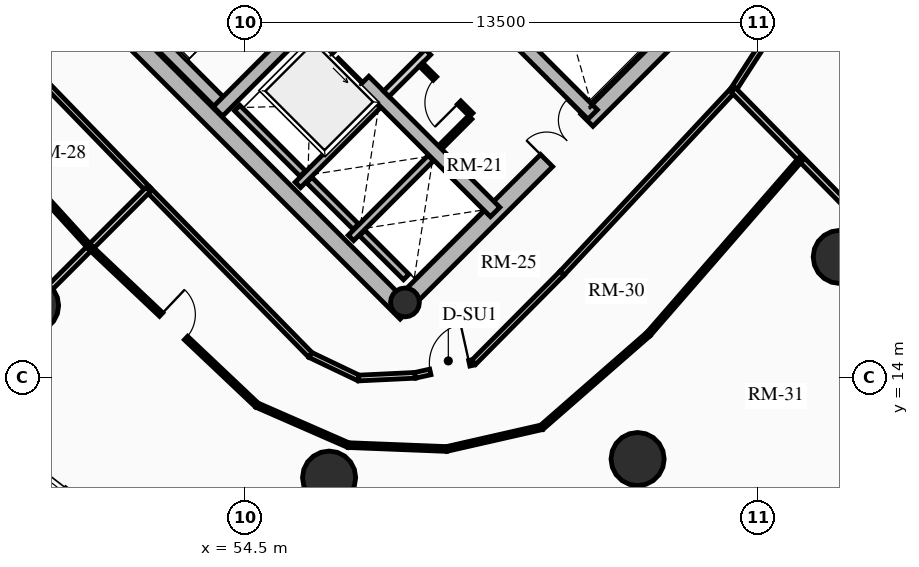
"""IFC4 building model, lengths in metres.
Left out: names, types, materials, properties, quantities, classifications, styles, units other than length and angle.
Written with IfcOpenShell. Run it as: python <this file> out.ifc"""

import sys

from ifc_helpers import new_model, si_unit, direction, frame, frame_2d, origin, origin_2d, place, context, subcontext, project, spatial, rectangle, circle, hollow_circle, extrude, source, transform, mapped, element, fill, save


model = new_model("IFC4")
c1 = context("Model", 3, precision=1e-05, world=origin(), true_north=direction((0.0, 1.0)))
c2 = subcontext(c1, "Body", "Model", "MODEL_VIEW")
j1 = project(units=[si_unit("LENGTHUNIT", "METRE"), si_unit("PLANEANGLEUNIT", "RADIAN")], contexts=[c1])
p1 = place(None, origin())
s1 = spatial("IfcSite", under=j1, at=p1, CompositionType="ELEMENT")
p2 = place(p1, origin())
s2 = spatial("IfcBuilding", under=s1, at=p2, CompositionType="ELEMENT")
p3 = place(p2, frame((0.0, 0.0, 93.43)))
s3 = spatial("IfcBuildingStorey", under=s2, at=p3, CompositionType="ELEMENT", Elevation=93.43)
p4 = place(p3, frame((58.737, 15.697, 0.0), z_axis=(0.0, 0.0, 1.0), x_axis=(-0.707106781187, 0.707106781187, 0.0)))
e1 = element("IfcWall", 1, at=p4, inside=s3, PredefinedType="SHEAR", context=c2, shape_type="SweptSolid", body=[
    extrude(rectangle(XDim=14.2, YDim=0.45, at=frame_2d((7.1, 0.0))), origin(), (0.0, 0.0, 1.0), 2.91),
])
p5 = place(p3, frame((58.578, 15.856, 0.0), z_axis=(0.0, 0.0, 1.0), x_axis=(0.707106781187, 0.707106781187, 0.0)))
e2 = element("IfcWall", 2, at=p5, inside=s3, PredefinedType="SHEAR", context=c2, shape_type="SweptSolid", body=[
    extrude(rectangle(XDim=10.7, YDim=0.45, at=frame_2d((5.35, 0.0))), origin(), (0.0, 0.0, 1.0), 2.91),
])
m1 = source(origin(), c2, "Body", "SweptSolid", [
    extrude(rectangle(XDim=1.5, YDim=2.02, at=frame_2d((0.75, 1.01))), frame((0.0, 0.235, 0.0), z_axis=(0.0, -1.0, 0.0), x_axis=(1.0, 0.0, 0.0)), (0.0, 0.0, 1.0), 0.47),
])
p6 = place(p5, frame((5.45, 0.0, 0.0)))
e3 = element("IfcOpeningElement", 3, at=p6, cuts=e2, PredefinedType="OPENING", context=c2, shape_type="MappedRepresentation", body=[
    mapped(m1, transform((0.0, 0.0, 0.0), x_axis=(1.0, 0.0, 0.0), y_axis=(0.0, 1.0, 0.0), z_axis=(0.0, 0.0, 1.0), scale=1.0)),
])
p7 = place(p3, frame((61.078, 18.355, 0.0), z_axis=(0.0, 0.0, 1.0), x_axis=(-0.707106781187, 0.707106781187, 0.0)))
e4 = element("IfcWall", 4, at=p7, inside=s3, PredefinedType="SHEAR", context=c2, shape_type="SweptSolid", body=[
    extrude(rectangle(XDim=13.75, YDim=0.35, at=frame_2d((6.875, 0.0))), origin(), (0.0, 0.0, 1.0), 2.91),
])
m2 = source(origin(), c2, "Body", "SweptSolid", [
    extrude(rectangle(XDim=1.1, YDim=2.015, at=frame_2d((0.55, 1.007))), frame((0.0, 0.185, 0.0), z_axis=(0.0, -1.0, 0.0), x_axis=(1.0, 0.0, 0.0)), (0.0, 0.0, 1.0), 0.37),
])
p8 = place(p7, frame((4.875, 0.0, 0.0)))
e5 = element("IfcOpeningElement", 5, at=p8, cuts=e4, PredefinedType="OPENING", context=c2, shape_type="MappedRepresentation", body=[
    mapped(m2, transform((0.0, 0.0, 0.0), x_axis=(1.0, 0.0, 0.0), y_axis=(0.0, 1.0, 0.0), z_axis=(0.0, 0.0, 1.0), scale=1.0)),
])
m3 = source(origin(), c2, "Body", "SweptSolid", [
    extrude(rectangle(XDim=1.15, YDim=2.02, at=frame_2d((0.575, 1.01))), frame((0.0, 0.185, 0.0), z_axis=(0.0, -1.0, 0.0), x_axis=(1.0, 0.0, 0.0)), (0.0, 0.0, 1.0), 0.37),
])
p9 = place(p7, frame((7.295, 0.0, 0.0)))
e6 = element("IfcOpeningElement", 6, at=p9, cuts=e4, PredefinedType="OPENING", context=c2, shape_type="MappedRepresentation", body=[
    mapped(m3, transform((0.0, 0.0, 0.0), x_axis=(1.0, 0.0, 0.0), y_axis=(0.0, 1.0, 0.0), z_axis=(0.0, 0.0, 1.0), scale=1.0)),
])
p10 = place(p3, frame((63.645, 20.922, 0.0), z_axis=(0.0, 0.0, 1.0), x_axis=(-0.707106781187, 0.707106781187, 0.0)))
e7 = element("IfcWall", 7, at=p10, inside=s3, PredefinedType="SHEAR", context=c2, shape_type="SweptSolid", body=[
    extrude(rectangle(XDim=13.75, YDim=0.35, at=frame_2d((6.875, 0.0))), origin(), (0.0, 0.0, 1.0), 2.91),
])
p11 = place(p10, frame((10.0, 0.0, 0.0)))
e8 = element("IfcOpeningElement", 8, at=p11, cuts=e7, PredefinedType="OPENING", context=c2, shape_type="MappedRepresentation", body=[
    mapped(m2, transform((0.0, 0.0, 0.0), x_axis=(1.0, 0.0, 0.0), y_axis=(0.0, 1.0, 0.0), z_axis=(0.0, 0.0, 1.0), scale=1.0)),
])
p12 = place(p10, frame((12.0, 0.0, 0.0)))
e9 = element("IfcOpeningElement", 9, at=p12, cuts=e7, PredefinedType="OPENING", context=c2, shape_type="MappedRepresentation", body=[
    mapped(m2, transform((0.0, 0.0, 0.0), x_axis=(1.0, 0.0, 0.0), y_axis=(0.0, 1.0, 0.0), z_axis=(0.0, 0.0, 1.0), scale=1.0)),
])
p13 = place(p10, frame((5.305, 0.0, 0.0)))
e10 = element("IfcOpeningElement", 10, at=p13, cuts=e7, PredefinedType="OPENING", context=c2, shape_type="MappedRepresentation", body=[
    mapped(m3, transform((0.0, 0.0, 0.0), x_axis=(1.0, 0.0, 0.0), y_axis=(0.0, 1.0, 0.0), z_axis=(0.0, 0.0, 1.0), scale=1.0)),
])
p14 = place(p3, frame((53.922, 21.141, 0.0), z_axis=(0.0, 0.0, 1.0), x_axis=(-0.707088616009, 0.707124945897, 0.0)))
e11 = element("IfcWall", 11, at=p14, inside=s3, PredefinedType="SHEAR", context=c2, shape_type="SweptSolid", body=[
    extrude(rectangle(XDim=6.72, YDim=0.35, at=frame_2d((3.36, 0.0))), origin(), (0.0, 0.0, 1.0), 2.91),
])
p15 = place(p3, frame((53.784, 21.003, 0.0), z_axis=(0.0, 0.0, 1.0), x_axis=(0.707106781187, 0.707106781187, 0.0)))
e12 = element("IfcWall", 12, at=p15, inside=s3, PredefinedType="SHEAR", context=c2, shape_type="SweptSolid", body=[
    extrude(rectangle(XDim=3.285, YDim=0.35, at=frame_2d((1.643, 0.0))), origin(), (0.0, 0.0, 1.0), 2.91),
])
p16 = place(p3, frame((58.706, 15.976, 0.0), z_axis=(0.0, 0.0, 1.0), x_axis=(0.707106781187, 0.707106781187, 0.0)))
e13 = element("IfcColumn", 13, at=p16, inside=s3, PredefinedType="COLUMN", context=c2, shape_type="SweptSolid", body=[
    extrude(hollow_circle(Radius=0.38, WallThickness=0.032, at=origin_2d()), origin(), (0.0, 0.0, 1.0), 2.91),
])
for number, where, z_axis, x_axis in (
    (14, (48.893, 15.893, 0.0), (0.0, 0.0, 1.0), (1.0, 0.0, 0.0)),
    (15, (56.709, 11.365, 0.0), (0.0, 0.0, 1.0), (1.0, 0.0, 0.0)),
    (16, (64.827, 11.854, 0.0), (0.0, 0.0, 1.0), (1.0, 0.0, 0.0)),
    (17, (70.146, 17.173, 0.0), (0.0, 0.0, 1.0), (1.0, 0.0, 0.0)),
):
    element("IfcColumn", number, at=place(p3, frame(where, z_axis=z_axis, x_axis=x_axis)), inside=s3, PredefinedType="USERDEFINED", context=c2, shape_type="SweptSolid", body=[
        extrude(circle(Radius=0.7, at=origin_2d()), origin(), (0.0, 0.0, 1.0), 2.91),
    ])
p17 = place(p3, frame((51.189, 9.855, 0.0), z_axis=(0.0, 0.0, 1.0), x_axis=(-0.791982052206, 0.61054437102, 0.0)))
e18 = element("IfcWall", 18, at=p17, inside=s3, PredefinedType="SOLIDWALL", context=c2, shape_type="SweptSolid", body=[
    extrude(rectangle(XDim=5.942, YDim=0.24, at=frame_2d((2.971, 0.0))), origin(), (0.0, 0.0, 1.0), 2.179),
])
m4 = source(origin(), c2, "Body", "SweptSolid", [
    extrude(rectangle(XDim=2.2, YDim=1.35, at=frame_2d((1.1, 0.675))), frame((0.0, 0.13, 0.0), z_axis=(0.0, -1.0, 0.0), x_axis=(1.0, 0.0, 0.0)), (0.0, 0.0, 1.0), 0.26),
])
p18 = place(p17, frame((1.871, 0.0, 0.65)))
e19 = element("IfcOpeningElement", 19, at=p18, cuts=e18, PredefinedType="OPENING", context=c2, shape_type="MappedRepresentation", body=[
    mapped(m4, transform((0.0, 0.0, 0.0), x_axis=(1.0, 0.0, 0.0), y_axis=(0.0, 1.0, 0.0), z_axis=(0.0, 0.0, 1.0), scale=1.0)),
])
p19 = place(p3, frame((55.888, 19.069, 0.0), z_axis=(0.0, 0.0, 1.0), x_axis=(0.707106781187, 0.707106781187, 0.0)))
e20 = element("IfcWall", 20, at=p19, inside=s3, PredefinedType="SHEAR", context=c2, shape_type="SweptSolid", body=[
    extrude(rectangle(XDim=2.97, YDim=0.2, at=frame_2d((1.485, 0.0))), origin(), (0.0, 0.0, 1.0), 2.91),
])
p20 = place(p3, frame((56.015, 19.366, 0.0), z_axis=(0.0, 0.0, 1.0), x_axis=(-0.707106781187, 0.707106781187, 0.0)))
e21 = element("IfcWall", 21, at=p20, inside=s3, PredefinedType="SHEAR", context=c2, shape_type="SweptSolid", body=[
    extrude(rectangle(XDim=2.44, YDim=0.2, at=frame_2d((1.22, 0.0))), origin(), (0.0, 0.0, 1.0), 2.91),
])
p21 = place(p3, frame((57.284, 17.673, 0.0), z_axis=(0.0, 0.0, 1.0), x_axis=(0.707147878904, 0.70706568108, 0.0)))
e22 = element("IfcWall", 22, at=p21, inside=s3, PredefinedType="SHEAR", context=c2, shape_type="SweptSolid", body=[
    extrude(rectangle(XDim=2.97, YDim=0.2, at=frame_2d((1.485, 0.0))), origin(), (0.0, 0.0, 1.0), 2.91),
])
p22 = place(p3, frame((57.412, 17.97, 0.0), z_axis=(0.0, 0.0, 1.0), x_axis=(-0.707106781187, 0.707106781187, 0.0)))
e23 = element("IfcWall", 23, at=p22, inside=s3, PredefinedType="SHEAR", context=c2, shape_type="SweptSolid", body=[
    extrude(rectangle(XDim=1.735, YDim=0.2, at=frame_2d((0.867, 0.0))), origin(), (0.0, 0.0, 1.0), 2.91),
])
p23 = place(p3, frame((58.737, 16.644, 0.0), z_axis=(0.0, 0.0, 1.0), x_axis=(-0.707032117043, 0.707181437447, 0.0)))
e24 = element("IfcWall", 24, at=p23, inside=s3, PredefinedType="SHEAR", context=c2, shape_type="SweptSolid", body=[
    extrude(rectangle(XDim=1.635, YDim=0.2, at=frame_2d((0.817, 0.0))), origin(), (0.0, 0.0, 1.0), 2.91),
])
p24 = place(p3, frame((58.214, 21.467, 0.0), z_axis=(0.0, 0.0, 1.0), x_axis=(0.707106781187, 0.707106781187, 0.0)))
e25 = element("IfcWall", 25, at=p24, inside=s3, PredefinedType="PARTITIONING", context=c2, shape_type="SweptSolid", body=[
    extrude(rectangle(XDim=3.28, YDim=0.2, at=frame_2d((1.64, 0.0))), origin(), (0.0, 0.0, 1.0), 2.655),
])
m5 = source(origin(), c2, "Body", "SweptSolid", [
    extrude(rectangle(XDim=1.5, YDim=2.02, at=frame_2d((0.75, 1.01))), frame((0.0, 0.11, 0.0), z_axis=(0.0, -1.0, 0.0), x_axis=(1.0, 0.0, 0.0)), (0.0, 0.0, 1.0), 0.22),
])
p25 = place(p24, frame((1.55, 0.0, 0.0)))
e26 = element("IfcOpeningElement", 26, at=p25, cuts=e25, PredefinedType="OPENING", context=c2, shape_type="MappedRepresentation", body=[
    mapped(m5, transform((0.0, 0.0, 0.0), x_axis=(1.0, 0.0, 0.0), y_axis=(0.0, 1.0, 0.0), z_axis=(0.0, 0.0, 1.0), scale=1.0)),
])
p26 = place(p3, frame((60.448, 20.915, 0.0), z_axis=(0.0, 0.0, 1.0), x_axis=(-0.707106781187, 0.707106781187, 0.0)))
e27 = element("IfcWall", 27, at=p26, inside=s3, PredefinedType="PARTITIONING", context=c2, shape_type="SweptSolid", body=[
    extrude(rectangle(XDim=1.87, YDim=0.125, at=frame_2d((0.935, 0.0))), origin(), (0.0, 0.0, 1.0), 2.655),
])
m6 = source(origin(), c2, "Body", "SweptSolid", [
    extrude(rectangle(XDim=0.9, YDim=2.005, at=frame_2d((0.45, 1.002))), frame((0.0, 0.073, 0.0), z_axis=(0.0, -1.0, 0.0), x_axis=(1.0, 0.0, 0.0)), (0.0, 0.0, 1.0), 0.145),
])
p27 = place(p26, frame((0.45, 0.0, 0.0)))
e28 = element("IfcOpeningElement", 28, at=p27, cuts=e27, PredefinedType="OPENING", context=c2, shape_type="MappedRepresentation", body=[
    mapped(m6, transform((0.0, 0.0, 0.0), x_axis=(1.0, 0.0, 0.0), y_axis=(0.0, 1.0, 0.0), z_axis=(0.0, 0.0, 1.0), scale=1.0)),
])
p28 = place(p3, frame((59.643, 20.066, 0.0), z_axis=(0.0, 0.0, 1.0), x_axis=(0.707106781187, 0.707106781187, 0.0)))
e29 = element("IfcWall", 29, at=p28, inside=s3, PredefinedType="PARTITIONING", context=c2, shape_type="SweptSolid", body=[
    extrude(rectangle(XDim=1.1, YDim=0.125, at=frame_2d((0.55, 0.0))), origin(), (0.0, 0.0, 1.0), 2.655),
])
p29 = place(p3, frame((47.786, 23.242, 0.0), z_axis=(0.0, 0.0, 1.0), x_axis=(0.696183456981, -0.717863910659, 0.0)))
e30 = element("IfcWall", 30, at=p29, inside=s3, PredefinedType="PARTITIONING", context=c2, shape_type="SweptSolid", body=[
    extrude(rectangle(XDim=5.979, YDim=0.15, at=frame_2d((2.99, 0.0))), origin(), (0.0, 0.0, 1.0), 2.655),
])
p30 = place(p3, frame((51.949, 18.949, 0.0), z_axis=(0.0, 0.0, 1.0), x_axis=(0.699801520154, -0.714337337951, 0.0)))
e31 = element("IfcWall", 31, at=p30, inside=s3, PredefinedType="PARTITIONING", context=c2, shape_type="SweptSolid", body=[
    extrude(rectangle(XDim=6.097, YDim=0.15, at=frame_2d((3.048, 0.0))), origin(), (0.0, 0.0, 1.0), 2.225),
])
p31 = place(p3, frame((56.216, 14.594, 0.0), z_axis=(0.0, 0.0, 1.0), x_axis=(0.902219207281, -0.431277755064, 0.0)))
e32 = element("IfcWall", 32, at=p31, inside=s3, PredefinedType="PARTITIONING", context=c2, shape_type="SweptSolid", body=[
    extrude(rectangle(XDim=1.41, YDim=0.15, at=frame_2d((0.705, 0.0))), origin(), (0.0, 0.0, 1.0), 2.225),
])
p32 = place(p3, frame((57.488, 13.986, 0.0), z_axis=(0.0, 0.0, 1.0), x_axis=(0.998863298217, 0.047666670476, 0.0)))
e33 = element("IfcWall", 33, at=p32, inside=s3, PredefinedType="PARTITIONING", context=c2, shape_type="SweptSolid", body=[
    extrude(rectangle(XDim=1.485, YDim=0.15, at=frame_2d((0.743, 0.0))), origin(), (0.0, 0.0, 1.0), 2.225),
])
p33 = place(p3, frame((58.971, 14.057, 0.0), z_axis=(0.0, 0.0, 1.0), x_axis=(0.976085233804, 0.217388169756, 0.0)))
e34 = element("IfcWall", 34, at=p33, inside=s3, PredefinedType="PARTITIONING", context=c2, shape_type="SweptSolid", body=[
    extrude(rectangle(XDim=1.581, YDim=0.15, at=frame_2d((0.791, 0.0))), origin(), (0.0, 0.0, 1.0), 2.225),
])
m7 = source(origin(), c2, "Body", "SweptSolid", [
    extrude(rectangle(XDim=1.05, YDim=2.015, at=frame_2d((0.525, 1.007))), frame((0.0, 0.085, 0.0), z_axis=(0.0, -1.0, 0.0), x_axis=(1.0, 0.0, 0.0)), (0.0, 0.0, 1.0), 0.17),
])
p34 = place(p33, frame((0.411, 0.0, 0.0)))
e35 = element("IfcOpeningElement", 35, at=p34, cuts=e34, PredefinedType="OPENING", context=c2, shape_type="MappedRepresentation", body=[
    mapped(m7, transform((0.0, 0.0, 0.0), x_axis=(1.0, 0.0, 0.0), y_axis=(0.0, 1.0, 0.0), z_axis=(0.0, 0.0, 1.0), scale=1.0)),
])
p35 = place(p3, frame((60.515, 14.401, 0.0), z_axis=(0.0, 0.0, 1.0), x_axis=(0.704179607439, 0.710021887316, 0.0)))
e36 = element("IfcWall", 36, at=p35, inside=s3, PredefinedType="PARTITIONING", context=c2, shape_type="SweptSolid", body=[
    extrude(rectangle(XDim=3.301, YDim=0.15, at=frame_2d((1.651, 0.0))), origin(), (0.0, 0.0, 1.0), 2.225),
])
p36 = place(p3, frame((62.839, 16.745, 0.0), z_axis=(0.0, 0.0, 1.0), x_axis=(0.682386779427, 0.73099130177, 0.0)))
e37 = element("IfcWall", 37, at=p36, inside=s3, PredefinedType="PARTITIONING", context=c2, shape_type="SweptSolid", body=[
    extrude(rectangle(XDim=6.6, YDim=0.15, at=frame_2d((3.3, 0.0))), origin(), (0.0, 0.0, 1.0), 2.225),
])
p37 = place(p3, frame((67.343, 21.569, 0.0), z_axis=(0.0, 0.0, 1.0), x_axis=(0.542722446786, 0.83991210597, 0.0)))
e38 = element("IfcWall", 38, at=p37, inside=s3, PredefinedType="PARTITIONING", context=c2, shape_type="SweptSolid", body=[
    extrude(rectangle(XDim=1.876, YDim=0.15, at=frame_2d((0.938, 0.0))), origin(), (0.0, 0.0, 1.0), 2.225),
])
p38 = place(p3, frame((51.949, 18.949, 0.0), z_axis=(0.0, 0.0, 1.0), x_axis=(-0.707106781187, -0.707106781187, 0.0)))
e39 = element("IfcWall", 39, at=p38, inside=s3, PredefinedType="PARTITIONING", context=c2, shape_type="SweptSolid", body=[
    extrude(rectangle(XDim=7.711, YDim=0.16, at=frame_2d((3.855, 0.0))), origin(), (0.0, 0.0, 1.0), 2.179),
])
p39 = place(p3, frame((67.343, 21.569, 0.0), z_axis=(0.0, 0.0, 1.0), x_axis=(0.700899237588, -0.713260302238, 0.0)))
e40 = element("IfcWall", 40, at=p39, inside=s3, PredefinedType="PARTITIONING", context=c2, shape_type="SweptSolid", body=[
    extrude(rectangle(XDim=9.085, YDim=0.16, at=frame_2d((4.543, 0.0))), origin(), (0.0, 0.0, 1.0), 2.179),
])
p40 = place(p3, frame((46.41, 21.83, 0.0), z_axis=(0.0, 0.0, 1.0), x_axis=(0.6732109009, -0.739450527696, 0.0)))
e41 = element("IfcWall", 41, at=p40, inside=s3, PredefinedType="PARTITIONING", context=c2, shape_type="SweptSolid", body=[
    extrude(rectangle(XDim=5.96, YDim=0.125, at=frame_2d((2.98, 0.0))), origin(), (0.0, 0.0, 1.0), 2.655),
])
p41 = place(p3, frame((50.423, 17.423, 0.0), z_axis=(0.0, 0.0, 1.0), x_axis=(0.726497320663, -0.68716929724, 0.0)))
e42 = element("IfcWall", 42, at=p41, inside=s3, PredefinedType="PARTITIONING", context=c2, shape_type="SweptSolid", body=[
    extrude(rectangle(XDim=6.04, YDim=0.125, at=frame_2d((3.02, 0.0))), origin(), (0.0, 0.0, 1.0), 2.225),
])
p42 = place(p41, frame((2.57, 0.0, 0.0)))
e43 = element("IfcOpeningElement", 43, at=p42, cuts=e42, PredefinedType="OPENING", context=c2, shape_type="MappedRepresentation", body=[
    mapped(m6, transform((0.0, 0.0, 0.0), x_axis=(1.0, 0.0, 0.0), y_axis=(0.0, 1.0, 0.0), z_axis=(0.0, 0.0, 1.0), scale=1.0)),
])
p43 = place(p3, frame((54.811, 13.272, 0.0), z_axis=(0.0, 0.0, 1.0), x_axis=(0.91625765715, -0.400589447831, 0.0)))
e44 = element("IfcWall", 44, at=p43, inside=s3, PredefinedType="PARTITIONING", context=c2, shape_type="SweptSolid", body=[
    extrude(rectangle(XDim=2.624, YDim=0.125, at=frame_2d((1.312, 0.0))), origin(), (0.0, 0.0, 1.0), 2.225),
])
p44 = place(p3, frame((57.215, 12.221, 0.0), z_axis=(0.0, 0.0, 1.0), x_axis=(0.999225050732, -0.039361122818, 0.0)))
e45 = element("IfcWall", 45, at=p44, inside=s3, PredefinedType="PARTITIONING", context=c2, shape_type="SweptSolid", body=[
    extrude(rectangle(XDim=2.586, YDim=0.125, at=frame_2d((1.293, 0.0))), origin(), (0.0, 0.0, 1.0), 2.655),
])
p45 = place(p3, frame((59.8, 12.119, 0.0), z_axis=(0.0, 0.0, 1.0), x_axis=(0.975045061532, 0.222007044895, 0.0)))
e46 = element("IfcWall", 46, at=p45, inside=s3, PredefinedType="PARTITIONING", context=c2, shape_type="SweptSolid", body=[
    extrude(rectangle(XDim=2.57, YDim=0.125, at=frame_2d((1.285, 0.0))), origin(), (0.0, 0.0, 1.0), 2.225),
])
p46 = place(p3, frame((62.306, 12.689, 0.0), z_axis=(0.0, 0.0, 1.0), x_axis=(0.753127589311, 0.657874482115, 0.0)))
e47 = element("IfcWall", 47, at=p46, inside=s3, PredefinedType="PARTITIONING", context=c2, shape_type="SweptSolid", body=[
    extrude(rectangle(XDim=3.732, YDim=0.125, at=frame_2d((1.866, 0.0))), origin(), (0.0, 0.0, 1.0), 2.225),
])
p47 = place(p3, frame((65.116, 15.145, 0.0), z_axis=(0.0, 0.0, 1.0), x_axis=(0.656272685344, 0.75452379848, 0.0)))
e48 = element("IfcWall", 48, at=p47, inside=s3, PredefinedType="PARTITIONING", context=c2, shape_type="SweptSolid", body=[
    extrude(rectangle(XDim=6.11, YDim=0.125, at=frame_2d((3.055, 0.0))), origin(), (0.0, 0.0, 1.0), 2.225),
])
m8 = source(origin(), c2, "Body", "SweptSolid", [
    extrude(rectangle(XDim=2.2, YDim=1.35, at=frame_2d((1.1, 0.675))), frame((0.0, 0.03, 0.0), z_axis=(0.0, -1.0, 0.0), x_axis=(1.0, 0.0, 0.0)), (0.0, 0.0, 1.0), 0.06),
])
p48 = place(p18, origin())
e49 = element("IfcWindow", 49, at=p48, inside=s3, PartitioningType="DOUBLE_PANEL_VERTICAL", PredefinedType="WINDOW", context=c2, shape_type="MappedRepresentation", body=[
    mapped(m8, transform((0.0, 0.0, 0.0), x_axis=(1.0, 0.0, 0.0), y_axis=(0.0, 1.0, 0.0), z_axis=(0.0, 0.0, 1.0), scale=1.0)),
])
fill(e19, e49)
m9 = source(origin(), c2, "Body", "SweptSolid", [
    extrude(rectangle(XDim=1.1, YDim=2.015, at=frame_2d((0.55, 1.007))), frame((0.0, 0.025, 0.0), z_axis=(0.0, -1.0, 0.0), x_axis=(1.0, 0.0, 0.0)), (0.0, 0.0, 1.0), 0.05),
])
p49 = place(p8, origin())
e50 = element("IfcDoor", 50, at=p49, inside=s3, OperationType="SLIDING_TO_LEFT", PredefinedType="DOOR", context=c2, shape_type="MappedRepresentation", body=[
    mapped(m9, transform((0.0, 0.0, 0.0), x_axis=(1.0, 0.0, 0.0), y_axis=(0.0, 1.0, 0.0), z_axis=(0.0, 0.0, 1.0), scale=1.0)),
])
fill(e5, e50)
m10 = source(origin(), c2, "Body", "SweptSolid", [
    extrude(rectangle(XDim=1.5, YDim=2.02, at=frame_2d((0.75, 1.01))), frame((0.0, 0.025, 0.0), z_axis=(0.0, -1.0, 0.0), x_axis=(1.0, 0.0, 0.0)), (0.0, 0.0, 1.0), 0.05),
])
p50 = place(p6, origin())
e51 = element("IfcDoor", 51, at=p50, inside=s3, OperationType="DOUBLE_DOOR_SINGLE_SWING", PredefinedType="DOOR", context=c2, shape_type="MappedRepresentation", body=[
    mapped(m10, transform((0.0, 0.0, 0.0), x_axis=(1.0, 0.0, 0.0), y_axis=(0.0, 1.0, 0.0), z_axis=(0.0, 0.0, 1.0), scale=1.0)),
])
fill(e3, e51)
p51 = place(p25, origin())
e52 = element("IfcDoor", 52, at=p51, inside=s3, OperationType="DOUBLE_DOOR_SINGLE_SWING", PredefinedType="DOOR", context=c2, shape_type="MappedRepresentation", body=[
    mapped(m10, transform((0.0, 0.0, 0.0), x_axis=(1.0, 0.0, 0.0), y_axis=(0.0, 1.0, 0.0), z_axis=(0.0, 0.0, 1.0), scale=1.0)),
])
fill(e26, e52)
m11 = source(origin(), c2, "Body", "SweptSolid", [
    extrude(rectangle(XDim=0.9, YDim=2.005, at=frame_2d((0.45, 1.002))), frame((0.0, 0.025, 0.0), z_axis=(0.0, -1.0, 0.0), x_axis=(1.0, 0.0, 0.0)), (0.0, 0.0, 1.0), 0.05),
])
p52 = place(p27, origin())
e53 = element("IfcDoor", 53, at=p52, inside=s3, OperationType="SINGLE_SWING_LEFT", PredefinedType="DOOR", context=c2, shape_type="MappedRepresentation", body=[
    mapped(m11, transform((0.0, 0.0, 0.0), x_axis=(1.0, 0.0, 0.0), y_axis=(0.0, 1.0, 0.0), z_axis=(0.0, 0.0, 1.0), scale=1.0)),
])
fill(e28, e53)
m12 = source(origin(), c2, "Body", "SweptSolid", [
    extrude(rectangle(XDim=1.05, YDim=2.015, at=frame_2d((0.525, 1.007))), frame((0.0, 0.025, 0.0), z_axis=(0.0, -1.0, 0.0), x_axis=(1.0, 0.0, 0.0)), (0.0, 0.0, 1.0), 0.05),
])
p53 = place(p34, origin())
e54 = element("IfcDoor", 54, at=p53, inside=s3, OperationType="SINGLE_SWING_RIGHT", PredefinedType="DOOR", context=c2, shape_type="MappedRepresentation", body=[
    mapped(m12, transform((0.0, 0.0, 0.0), x_axis=(1.0, 0.0, 0.0), y_axis=(0.0, 1.0, 0.0), z_axis=(0.0, 0.0, 1.0), scale=1.0)),
])
fill(e35, e54)
p54 = place(p42, origin())
e55 = element("IfcDoor", 55, at=p54, inside=s3, OperationType="SINGLE_SWING_LEFT", PredefinedType="DOOR", context=c2, shape_type="MappedRepresentation", body=[
    mapped(m11, transform((0.0, 0.0, 0.0), x_axis=(1.0, 0.0, 0.0), y_axis=(0.0, 1.0, 0.0), z_axis=(0.0, 0.0, 1.0), scale=1.0)),
])
fill(e43, e55)
save(model, sys.argv[1])
